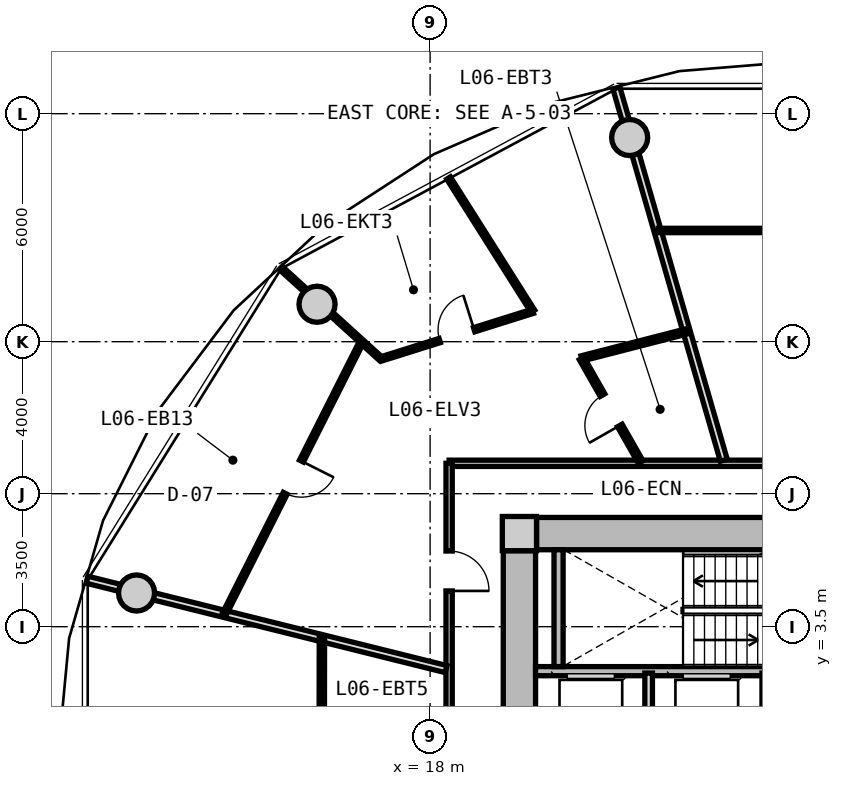
"""IFC4 building model, lengths in metres.
Left out: names, types, materials, properties, quantities, classifications, styles, units other than length and angle.
Written with IfcOpenShell. Run it as: python <this file> out.ifc"""

import sys

from ifc_helpers import new_model, si_unit, direction, frame, frame_2d, origin, origin_2d, place, context, subcontext, project, spatial, rectangle, circle, extrude, source, transform, mapped, element, fill, save


model = new_model("IFC4")
c1 = context("Model", 3, precision=1e-05, world=origin(), true_north=direction((0.0, 1.0)))
c2 = subcontext(c1, "Body", "Model", "MODEL_VIEW")
j1 = project(units=[si_unit("LENGTHUNIT", "METRE"), si_unit("PLANEANGLEUNIT", "RADIAN")], contexts=[c1])
p1 = place(None, origin())
s1 = spatial("IfcSite", under=j1, at=p1, CompositionType="ELEMENT")
p2 = place(p1, origin())
s2 = spatial("IfcBuilding", under=s1, at=p2, CompositionType="ELEMENT")
p3 = place(p2, frame((0.0, 0.0, 24.65)))
s3 = spatial("IfcBuildingStorey", under=s2, at=p3, CompositionType="ELEMENT", Elevation=24.65)
m1 = source(origin(), c2, "Body", "SweptSolid", [
    extrude(rectangle(XDim=0.9, YDim=0.9, at=origin_2d()), origin(), (0.0, 0.0, 1.0), 3.05),
])
p4 = place(p3, frame((20.35, 5.95, 0.0), z_axis=(0.0, 0.0, 1.0), x_axis=(1.0, 0.0, 0.0)))
e1 = element("IfcColumn", 1, at=p4, inside=s3, PredefinedType="COLUMN", context=c2, shape_type="MappedRepresentation", body=[
    mapped(m1, transform((0.0, 0.0, 0.0), x_axis=(1.0, 0.0, 0.0), y_axis=(0.0, 1.0, 0.0), z_axis=(0.0, 0.0, 1.0), scale=1.0)),
])
m2 = source(origin(), c2, "Body", "SweptSolid", [
    extrude(rectangle(XDim=14.4, YDim=0.85, at=frame_2d((7.2, 0.0))), origin(), (0.0, 0.0, 1.0), 2.79),
])
p5 = place(p3, frame((20.8, 5.95, 0.0), z_axis=(0.0, 0.0, 1.0), x_axis=(1.0, 0.0, 0.0)))
e2 = element("IfcWall", 2, at=p5, inside=s3, PredefinedType="SHEAR", context=c2, shape_type="MappedRepresentation", body=[
    mapped(m2, transform((0.0, 0.0, 0.0), x_axis=(1.0, 0.0, 0.0), y_axis=(0.0, 1.0, 0.0), z_axis=(0.0, 0.0, 1.0), scale=1.0)),
])
m3 = source(origin(), c2, "Body", "SweptSolid", [
    extrude(rectangle(XDim=11.0, YDim=0.85, at=frame_2d((5.5, 0.0))), origin(), (0.0, 0.0, 1.0), 2.79),
])
p6 = place(p3, frame((20.35, -5.5, 0.0), z_axis=(0.0, 0.0, 1.0), x_axis=(0.0, 1.0, 0.0)))
e3 = element("IfcWall", 3, at=p6, inside=s3, PredefinedType="SHEAR", context=c2, shape_type="MappedRepresentation", body=[
    mapped(m3, transform((0.0, 0.0, 0.0), x_axis=(1.0, 0.0, 0.0), y_axis=(0.0, 1.0, 0.0), z_axis=(0.0, 0.0, 1.0), scale=1.0)),
])
p7 = place(p6, frame((3.8, 0.0, 0.0)))
e4 = element("IfcOpeningElement", 4, at=p7, cuts=e3, PredefinedType="OPENING", context=c2, shape_type="SweptSolid", body=[
    extrude(rectangle(XDim=1.2, YDim=2.15, at=frame_2d((0.6, 1.075))), frame((0.0, 0.435, 0.0), z_axis=(0.0, -1.0, 0.0), x_axis=(1.0, 0.0, 0.0)), (0.0, 0.0, 1.0), 0.87),
])
m4 = source(origin(), c2, "Body", "SweptSolid", [
    extrude(circle(Radius=0.475, at=origin_2d()), origin(), (0.0, 0.0, 1.0), 3.05),
])
for number, where, z_axis, x_axis in (
    (5, (23.251, 16.373, 0.0), (0.0, 0.0, 1.0), (1.0, 0.0, 0.0)),
    (6, (15.025, 11.985, 0.0), (0.0, 0.0, 1.0), (1.0, 0.0, 0.0)),
    (7, (10.275, 4.387, 0.0), (0.0, 0.0, 1.0), (1.0, 0.0, 0.0)),
):
    element("IfcColumn", number, at=place(p3, frame(where, z_axis=z_axis, x_axis=x_axis)), inside=s3, PredefinedType="COLUMN", context=c2, shape_type="MappedRepresentation", body=[
        mapped(m4, transform((0.0, 0.0, 0.0), x_axis=(1.0, 0.0, 0.0), y_axis=(0.0, 1.0, 0.0), z_axis=(0.0, 0.0, 1.0), scale=1.0)),
    ])
m5 = source(origin(), c2, "Body", "SweptSolid", [
    extrude(rectangle(XDim=7.765, YDim=0.24, at=frame_2d((3.883, 0.0))), origin(), (0.0, 0.0, 1.0), 2.79),
])
p8 = place(p3, frame((20.775, 2.33, 0.0), z_axis=(0.0, 0.0, 1.0), x_axis=(1.0, 0.0, 0.0)))
e8 = element("IfcWall", 8, at=p8, inside=s3, PredefinedType="PARTITIONING", context=c2, shape_type="MappedRepresentation", body=[
    mapped(m5, transform((0.0, 0.0, 0.0), x_axis=(1.0, 0.0, 0.0), y_axis=(0.0, 1.0, 0.0), z_axis=(0.0, 0.0, 1.0), scale=1.0)),
])
m6 = source(origin(), c2, "Body", "SweptSolid", [
    extrude(rectangle(XDim=3.075, YDim=0.24, at=frame_2d((1.538, 0.0))), origin(), (0.0, 0.0, 1.0), 2.79),
])
p9 = place(p3, frame((21.38, 2.45, 0.0), z_axis=(0.0, 0.0, 1.0), x_axis=(0.0, 1.0, 0.0)))
e9 = element("IfcWall", 9, at=p9, inside=s3, PredefinedType="PARTITIONING", context=c2, shape_type="MappedRepresentation", body=[
    mapped(m6, transform((0.0, 0.0, 0.0), x_axis=(1.0, 0.0, 0.0), y_axis=(0.0, 1.0, 0.0), z_axis=(0.0, 0.0, 1.0), scale=1.0)),
])
m7 = source(origin(), c2, "Body", "SweptSolid", [
    extrude(rectangle(XDim=2.33, YDim=0.115, at=frame_2d((1.165, 0.0))), origin(), (0.0, 0.0, 1.0), 2.775),
])
p10 = place(p3, frame((26.79, -0.05, 0.0), z_axis=(0.0, 0.0, 1.0), x_axis=(0.0, 1.0, 0.0)))
e10 = element("IfcWall", 10, at=p10, inside=s3, PredefinedType="PARTITIONING", context=c2, shape_type="MappedRepresentation", body=[
    mapped(m7, transform((0.0, 0.0, 0.0), x_axis=(1.0, 0.0, 0.0), y_axis=(0.0, 1.0, 0.0), z_axis=(0.0, 0.0, 1.0), scale=1.0)),
])
m8 = source(origin(), c2, "Body", "SweptSolid", [
    extrude(rectangle(XDim=2.33, YDim=0.2, at=frame_2d((1.165, 0.0))), origin(), (0.0, 0.0, 1.0), 2.775),
])
p11 = place(p3, frame((23.75, -0.05, 0.0), z_axis=(0.0, 0.0, 1.0), x_axis=(0.0, 1.0, 0.0)))
e11 = element("IfcWall", 11, at=p11, inside=s3, PredefinedType="PARTITIONING", context=c2, shape_type="MappedRepresentation", body=[
    mapped(m8, transform((0.0, 0.0, 0.0), x_axis=(1.0, 0.0, 0.0), y_axis=(0.0, 1.0, 0.0), z_axis=(0.0, 0.0, 1.0), scale=1.0)),
])
m9 = source(origin(), c2, "Body", "SweptSolid", [
    extrude(rectangle(XDim=19.0, YDim=0.165, at=frame_2d((9.5, 0.0))), origin(), (0.0, 0.0, 1.0), 2.775),
])
p12 = place(p3, frame((18.5, 7.8, 0.0), z_axis=(0.0, 0.0, 1.0), x_axis=(1.0, 0.0, 0.0)))
e12 = element("IfcWall", 12, at=p12, inside=s3, PredefinedType="PARTITIONING", context=c2, shape_type="MappedRepresentation", body=[
    mapped(m9, transform((0.0, 0.0, 0.0), x_axis=(1.0, 0.0, 0.0), y_axis=(0.0, 1.0, 0.0), z_axis=(0.0, 0.0, 1.0), scale=1.0)),
])
p13 = place(p12, frame((10.448, 0.0, 0.0)))
e13 = element("IfcOpeningElement", 13, at=p13, cuts=e12, PredefinedType="OPENING", context=c2, shape_type="SweptSolid", body=[
    extrude(rectangle(XDim=1.05, YDim=2.15, at=frame_2d((0.525, 1.075))), frame((0.0, 0.093, 0.0), z_axis=(0.0, -1.0, 0.0), x_axis=(1.0, 0.0, 0.0)), (0.0, 0.0, 1.0), 0.185),
])
m10 = source(origin(), c2, "Body", "SweptSolid", [
    extrude(rectangle(XDim=15.6, YDim=0.165, at=frame_2d((7.8, 0.0))), origin(), (0.0, 0.0, 1.0), 2.775),
])
p14 = place(p3, frame((18.5, -7.8, 0.0), z_axis=(0.0, 0.0, 1.0), x_axis=(0.0, 1.0, 0.0)))
e14 = element("IfcWall", 14, at=p14, inside=s3, PredefinedType="PARTITIONING", context=c2, shape_type="MappedRepresentation", body=[
    mapped(m10, transform((0.0, 0.0, 0.0), x_axis=(1.0, 0.0, 0.0), y_axis=(0.0, 1.0, 0.0), z_axis=(0.0, 0.0, 1.0), scale=1.0)),
])
p15 = place(p14, frame((12.241, 0.0, 0.0)))
e15 = element("IfcOpeningElement", 15, at=p15, cuts=e14, PredefinedType="OPENING", context=c2, shape_type="SweptSolid", body=[
    extrude(rectangle(XDim=1.05, YDim=2.15, at=frame_2d((0.525, 1.075))), frame((0.0, 0.093, 0.0), z_axis=(0.0, -1.0, 0.0), x_axis=(1.0, 0.0, 0.0)), (0.0, 0.0, 1.0), 0.185),
])
p16 = place(p14, frame((3.63, 0.0, 0.0)))
e16 = element("IfcOpeningElement", 16, at=p16, cuts=e14, PredefinedType="OPENING", context=c2, shape_type="SweptSolid", body=[
    extrude(rectangle(XDim=1.05, YDim=2.15, at=frame_2d((0.525, 1.075))), frame((0.0, 0.093, 0.0), z_axis=(0.0, -1.0, 0.0), x_axis=(1.0, 0.0, 0.0)), (0.0, 0.0, 1.0), 0.185),
])
m11 = source(origin(), c2, "Body", "SweptSolid", [
    extrude(rectangle(XDim=10.196, YDim=0.19, at=frame_2d((5.098, 0.0))), origin(), (0.0, 0.0, 1.0), 2.225),
])
p17 = place(p3, frame((25.727, 7.88, 0.0), z_axis=(0.0, 0.0, 1.0), x_axis=(-0.277136420347, 0.960830580549, 0.0)))
e17 = element("IfcWall", 17, at=p17, inside=s3, PredefinedType="PARTITIONING", context=c2, shape_type="MappedRepresentation", body=[
    mapped(m11, transform((0.0, 0.0, 0.0), x_axis=(1.0, 0.0, 0.0), y_axis=(0.0, 1.0, 0.0), z_axis=(0.0, 0.0, 1.0), scale=1.0)),
])
m12 = source(origin(), c2, "Body", "SweptSolid", [
    extrude(rectangle(XDim=7.993, YDim=0.115, at=frame_2d((3.996, 0.0))), origin(), (0.0, 0.0, 1.0), 2.775),
])
p18 = place(p3, frame((31.996, 13.927, 0.0), z_axis=(0.0, 0.0, 1.0), x_axis=(-1.0, 0.0, 0.0)))
e18 = element("IfcWall", 18, at=p18, inside=s3, PredefinedType="PARTITIONING", context=c2, shape_type="MappedRepresentation", body=[
    mapped(m12, transform((0.0, 0.0, 0.0), x_axis=(1.0, 0.0, 0.0), y_axis=(0.0, 1.0, 0.0), z_axis=(0.0, 0.0, 1.0), scale=1.0)),
])
p19 = place(p18, frame((3.521, 0.0, 0.0)))
e19 = element("IfcOpeningElement", 19, at=p19, cuts=e18, PredefinedType="OPENING", context=c2, shape_type="SweptSolid", body=[
    extrude(rectangle(XDim=0.95, YDim=2.1, at=frame_2d((0.475, 1.05))), frame((0.0, 0.067, 0.0), z_axis=(0.0, -1.0, 0.0), x_axis=(1.0, 0.0, 0.0)), (0.0, 0.0, 1.0), 0.135),
])
m13 = source(origin(), c2, "Body", "SweptSolid", [
    extrude(rectangle(XDim=9.737, YDim=0.19, at=frame_2d((4.869, 0.0))), origin(), (0.0, 0.0, 1.0), 2.225),
])
p20 = place(p3, frame((18.42, 2.385, 0.0), z_axis=(0.0, 0.0, 1.0), x_axis=(-0.970392716238, 0.241532557375, 0.0)))
e20 = element("IfcWall", 20, at=p20, inside=s3, PredefinedType="PARTITIONING", context=c2, shape_type="MappedRepresentation", body=[
    mapped(m13, transform((0.0, 0.0, 0.0), x_axis=(1.0, 0.0, 0.0), y_axis=(0.0, 1.0, 0.0), z_axis=(0.0, 0.0, 1.0), scale=1.0)),
])
m14 = source(origin(), c2, "Body", "SweptSolid", [
    extrude(rectangle(XDim=8.018, YDim=0.115, at=frame_2d((4.009, 0.0))), origin(), (0.0, 0.0, 1.0), 2.775),
])
p21 = place(p3, frame((16.205, 11.014, 0.0), z_axis=(0.0, 0.0, 1.0), x_axis=(-0.450134355233, -0.89296084026, 0.0)))
e21 = element("IfcWall", 21, at=p21, inside=s3, PredefinedType="PARTITIONING", context=c2, shape_type="MappedRepresentation", body=[
    mapped(m14, transform((0.0, 0.0, 0.0), x_axis=(1.0, 0.0, 0.0), y_axis=(0.0, 1.0, 0.0), z_axis=(0.0, 0.0, 1.0), scale=1.0)),
])
p22 = place(p21, frame((3.534, 0.0, 0.0)))
e22 = element("IfcOpeningElement", 22, at=p22, cuts=e21, PredefinedType="OPENING", context=c2, shape_type="SweptSolid", body=[
    extrude(rectangle(XDim=0.95, YDim=2.1, at=frame_2d((0.475, 1.05))), frame((0.0, 0.067, 0.0), z_axis=(0.0, -1.0, 0.0), x_axis=(1.0, 0.0, 0.0)), (0.0, 0.0, 1.0), 0.135),
])
m15 = source(origin(), c2, "Body", "SweptSolid", [
    extrude(rectangle(XDim=3.551, YDim=0.115, at=frame_2d((1.775, 0.0))), origin(), (0.0, 0.0, 1.0), 2.225),
])
p23 = place(p3, frame((16.698, 10.553, 0.0), z_axis=(0.0, 0.0, 1.0), x_axis=(-0.740291560769, 0.672285954824, 0.0)))
e23 = element("IfcWall", 23, at=p23, inside=s3, PredefinedType="PARTITIONING", context=c2, shape_type="MappedRepresentation", body=[
    mapped(m15, transform((0.0, 0.0, 0.0), x_axis=(1.0, 0.0, 0.0), y_axis=(0.0, 1.0, 0.0), z_axis=(0.0, 0.0, 1.0), scale=1.0)),
])
m16 = source(origin(), c2, "Body", "SweptSolid", [
    extrude(rectangle(XDim=3.141, YDim=0.14, at=frame_2d((1.571, 0.0))), origin(), (0.0, 0.0, 1.0), 2.775),
])
p24 = place(p3, frame((23.542, 7.83, 0.0), z_axis=(0.0, 0.0, 1.0), x_axis=(-0.494874486088, 0.868964465913, 0.0)))
e24 = element("IfcWall", 24, at=p24, inside=s3, PredefinedType="PARTITIONING", context=c2, shape_type="MappedRepresentation", body=[
    mapped(m16, transform((0.0, 0.0, 0.0), x_axis=(1.0, 0.0, 0.0), y_axis=(0.0, 1.0, 0.0), z_axis=(0.0, 0.0, 1.0), scale=1.0)),
])
p25 = place(p24, frame((1.111, 0.0, 0.0)))
e25 = element("IfcOpeningElement", 25, at=p25, cuts=e24, PredefinedType="OPENING", context=c2, shape_type="SweptSolid", body=[
    extrude(rectangle(XDim=0.92, YDim=2.1, at=frame_2d((0.46, 1.05))), frame((0.0, 0.08, 0.0), z_axis=(0.0, -1.0, 0.0), x_axis=(1.0, 0.0, 0.0)), (0.0, 0.0, 1.0), 0.16),
])
m17 = source(origin(), c2, "Body", "SweptSolid", [
    extrude(rectangle(XDim=2.868, YDim=0.14, at=frame_2d((1.434, 0.0))), origin(), (0.0, 0.0, 1.0), 2.775),
])
p26 = place(p3, frame((21.987, 10.56, 0.0), z_axis=(0.0, 0.0, 1.0), x_axis=(0.968467705195, 0.249139125778, 0.0)))
e26 = element("IfcWall", 26, at=p26, inside=s3, PredefinedType="PARTITIONING", context=c2, shape_type="MappedRepresentation", body=[
    mapped(m17, transform((0.0, 0.0, 0.0), x_axis=(1.0, 0.0, 0.0), y_axis=(0.0, 1.0, 0.0), z_axis=(0.0, 0.0, 1.0), scale=1.0)),
])
m18 = source(origin(), c2, "Body", "SweptSolid", [
    extrude(rectangle(XDim=4.15, YDim=0.115, at=frame_2d((2.075, 0.0))), origin(), (0.0, 0.0, 1.0), 2.775),
])
p27 = place(p3, frame((20.704, 11.801, 0.0), z_axis=(0.0, 0.0, 1.0), x_axis=(-0.534475378192, 0.845184045109, 0.0)))
e27 = element("IfcWall", 27, at=p27, inside=s3, PredefinedType="PARTITIONING", context=c2, shape_type="MappedRepresentation", body=[
    mapped(m18, transform((0.0, 0.0, 0.0), x_axis=(1.0, 0.0, 0.0), y_axis=(0.0, 1.0, 0.0), z_axis=(0.0, 0.0, 1.0), scale=1.0)),
])
m19 = source(origin(), c2, "Body", "SweptSolid", [
    extrude(rectangle(XDim=4.189, YDim=0.115, at=frame_2d((2.094, 0.0))), origin(), (0.0, 0.0, 1.0), 2.775),
])
p28 = place(p3, frame((20.704, 11.801, 0.0), z_axis=(0.0, 0.0, 1.0), x_axis=(-0.954002766053, -0.299797802467, 0.0)))
e28 = element("IfcWall", 28, at=p28, inside=s3, PredefinedType="PARTITIONING", context=c2, shape_type="MappedRepresentation", body=[
    mapped(m19, transform((0.0, 0.0, 0.0), x_axis=(1.0, 0.0, 0.0), y_axis=(0.0, 1.0, 0.0), z_axis=(0.0, 0.0, 1.0), scale=1.0)),
])
p29 = place(p28, frame((1.619, 0.0, 0.0)))
e29 = element("IfcOpeningElement", 29, at=p29, cuts=e28, PredefinedType="OPENING", context=c2, shape_type="SweptSolid", body=[
    extrude(rectangle(XDim=0.95, YDim=2.1, at=frame_2d((0.475, 1.05))), frame((0.0, 0.067, 0.0), z_axis=(0.0, -1.0, 0.0), x_axis=(1.0, 0.0, 0.0)), (0.0, 0.0, 1.0), 0.135),
])
m20 = source(origin(), c2, "Body", "SweptSolid", [
    extrude(rectangle(XDim=2.795, YDim=0.14, at=frame_2d((1.397, 0.0))), origin(), (0.0, 0.0, 1.0), 2.775),
])
p30 = place(p3, frame((15.148, 0.419, 0.0), z_axis=(0.0, 0.0, 1.0), x_axis=(0.001659531299, 0.999998622977, 0.0)))
e30 = element("IfcWall", 30, at=p30, inside=s3, PredefinedType="PARTITIONING", context=c2, shape_type="MappedRepresentation", body=[
    mapped(m20, transform((0.0, 0.0, 0.0), x_axis=(1.0, 0.0, 0.0), y_axis=(0.0, 1.0, 0.0), z_axis=(0.0, 0.0, 1.0), scale=1.0)),
])
m21 = source(origin(), c2, "Body", "SweptSolid", [
    extrude(rectangle(XDim=1.05, YDim=2.15, at=frame_2d((0.525, 1.075))), frame((0.0, 0.025, 0.0), z_axis=(0.0, -1.0, 0.0), x_axis=(1.0, 0.0, 0.0)), (0.0, 0.0, 1.0), 0.05),
])
p31 = place(p15, frame((1.05, 0.0, 0.0), z_axis=(0.0, 0.0, 1.0), x_axis=(-1.0, 0.0, 0.0)))
e31 = element("IfcDoor", 31, at=p31, inside=s3, OperationType="SINGLE_SWING_RIGHT", PredefinedType="DOOR", context=c2, shape_type="MappedRepresentation", body=[
    mapped(m21, transform((0.0, 0.0, 0.0), x_axis=(1.0, 0.0, 0.0), y_axis=(0.0, 1.0, 0.0), z_axis=(0.0, 0.0, 1.0), scale=1.0)),
])
fill(e15, e31)
m22 = source(origin(), c2, "Body", "SweptSolid", [
    extrude(rectangle(XDim=0.92, YDim=2.1, at=frame_2d((0.46, 1.05))), frame((0.0, 0.025, 0.0), z_axis=(0.0, -1.0, 0.0), x_axis=(1.0, 0.0, 0.0)), (0.0, 0.0, 1.0), 0.05),
])
p32 = place(p25, origin())
e32 = element("IfcDoor", 32, at=p32, inside=s3, OperationType="SINGLE_SWING_LEFT", PredefinedType="DOOR", context=c2, shape_type="MappedRepresentation", body=[
    mapped(m22, transform((0.0, 0.0, 0.0), x_axis=(1.0, 0.0, 0.0), y_axis=(0.0, 1.0, 0.0), z_axis=(0.0, 0.0, 1.0), scale=1.0)),
])
fill(e25, e32)
m23 = source(origin(), c2, "Body", "SweptSolid", [
    extrude(rectangle(XDim=0.95, YDim=2.1, at=frame_2d((0.475, 1.05))), frame((0.0, 0.025, 0.0), z_axis=(0.0, -1.0, 0.0), x_axis=(1.0, 0.0, 0.0)), (0.0, 0.0, 1.0), 0.05),
])
p33 = place(p29, frame((0.95, 0.0, 0.0), z_axis=(0.0, 0.0, 1.0), x_axis=(-1.0, 0.0, 0.0)))
e33 = element("IfcDoor", 33, at=p33, inside=s3, OperationType="SINGLE_SWING_RIGHT", PredefinedType="DOOR", context=c2, shape_type="MappedRepresentation", body=[
    mapped(m23, transform((0.0, 0.0, 0.0), x_axis=(1.0, 0.0, 0.0), y_axis=(0.0, 1.0, 0.0), z_axis=(0.0, 0.0, 1.0), scale=1.0)),
])
fill(e29, e33)
p34 = place(p22, origin())
e34 = element("IfcDoor", 34, at=p34, inside=s3, OperationType="SINGLE_SWING_LEFT", PredefinedType="DOOR", context=c2, shape_type="MappedRepresentation", body=[
    mapped(m23, transform((0.0, 0.0, 0.0), x_axis=(1.0, 0.0, 0.0), y_axis=(0.0, 1.0, 0.0), z_axis=(0.0, 0.0, 1.0), scale=1.0)),
])
fill(e22, e34)
save(model, sys.argv[1])
